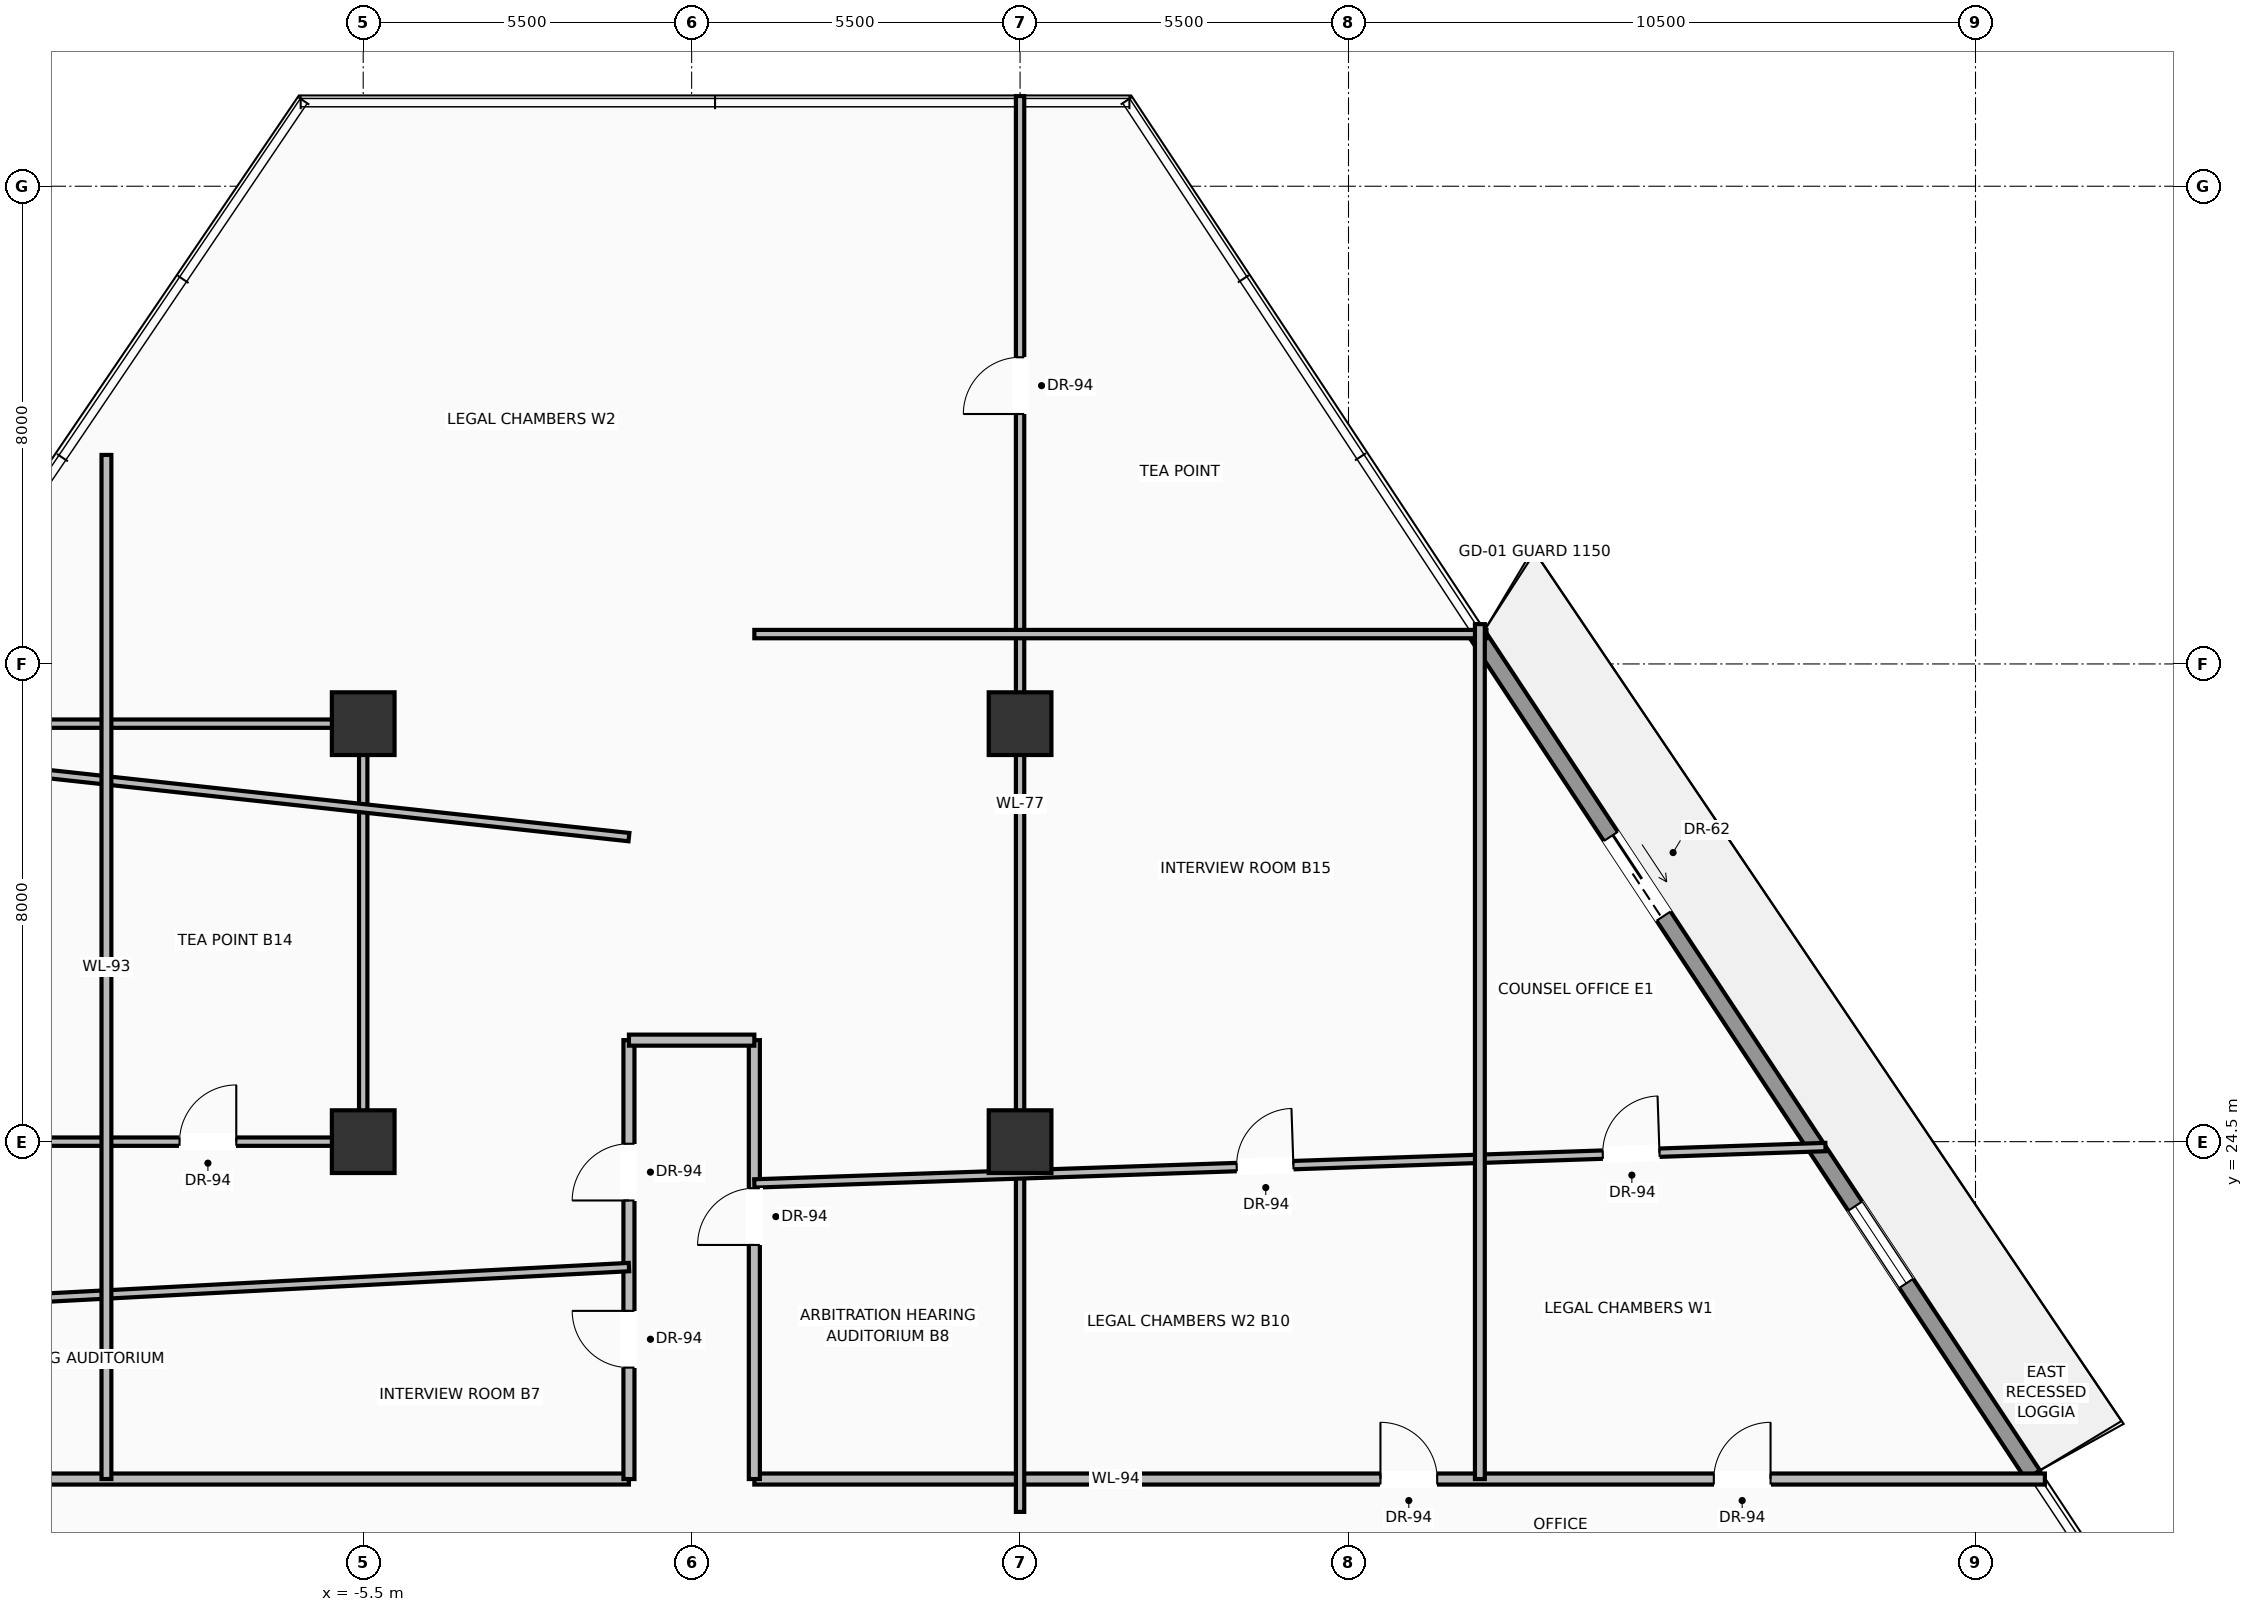
"""IFC4 building model, lengths in metres.
Left out: names, types, materials, properties, quantities, classifications, styles, units other than length and angle.
Written with IfcOpenShell. Run it as: python <this file> out.ifc"""

import sys

from ifc_helpers import new_model, si_unit, direction, frame, frame_2d, origin, origin_2d, place, context, subcontext, project, spatial, rectangle, extrude, source, transform, mapped, element, fill, save


model = new_model("IFC4")
c1 = context("Model", 3, precision=1e-05, world=origin(), true_north=direction((0.0, 1.0)))
c2 = subcontext(c1, "Body", "Model", "MODEL_VIEW")
j1 = project(units=[si_unit("LENGTHUNIT", "METRE"), si_unit("PLANEANGLEUNIT", "RADIAN")], contexts=[c1])
p1 = place(None, origin())
s1 = spatial("IfcSite", under=j1, at=p1, CompositionType="ELEMENT")
p2 = place(p1, origin())
s2 = spatial("IfcBuilding", under=s1, at=p2, CompositionType="ELEMENT")
p3 = place(p2, frame((0.0, 0.0, 64.5)))
s3 = spatial("IfcBuildingStorey", under=s2, at=p3, CompositionType="ELEMENT", Elevation=64.5)
m1 = source(origin(), c2, "Body", "SweptSolid", [
    extrude(rectangle(XDim=1.05, YDim=1.05, at=origin_2d()), origin(), (0.0, 0.0, 1.0), 3.7),
])
for number, where, z_axis, x_axis in (
    (1, (-5.5, 24.5, 0.0), (0.0, 0.0, 1.0), (1.0, 0.0, 0.0)),
    (2, (5.5, 24.5, 0.0), (0.0, 0.0, 1.0), (1.0, 0.0, 0.0)),
    (3, (-5.5, 31.5, 0.0), (0.0, 0.0, 1.0), (1.0, 0.0, 0.0)),
    (4, (5.5, 31.5, 0.0), (0.0, 0.0, 1.0), (1.0, 0.0, 0.0)),
):
    element("IfcColumn", number, at=place(p3, frame(where, z_axis=z_axis, x_axis=x_axis)), inside=s3, PredefinedType="COLUMN", context=c2, shape_type="MappedRepresentation", body=[
        mapped(m1, transform((0.0, 0.0, 0.0), scale=1.0)),
    ])
p4 = place(p3, frame((13.162, 32.989, 0.0), z_axis=(0.0, 0.0, 1.0), x_axis=(0.551365400427, -0.834263864261, 0.0)))
e5 = element("IfcWall", 5, at=p4, inside=s3, PredefinedType="SOLIDWALL", context=c2, shape_type="SweptSolid", body=[
    extrude(rectangle(XDim=16.866, YDim=0.28, at=frame_2d((8.433, 0.0))), origin(), (0.0, 0.0, 1.0), 3.03),
])
p5 = place(p4, frame((4.048, 0.0, 0.0)))
e6 = element("IfcOpeningElement", 6, at=p5, cuts=e5, PredefinedType="OPENING", context=c2, shape_type="SweptSolid", body=[
    extrude(rectangle(XDim=1.6, YDim=2.35, at=frame_2d((0.8, 1.175))), frame((0.0, 0.15, 0.0), z_axis=(0.0, -1.0, 0.0), x_axis=(1.0, 0.0, 0.0)), (0.0, 0.0, 1.0), 0.3),
])
p6 = place(p4, frame((11.469, 0.0, 0.9)))
e7 = element("IfcOpeningElement", 7, at=p6, cuts=e5, PredefinedType="OPENING", context=c2, shape_type="SweptSolid", body=[
    extrude(rectangle(XDim=1.55, YDim=1.85, at=frame_2d((0.775, 0.925))), frame((0.0, 0.15, 0.0), z_axis=(0.0, -1.0, 0.0), x_axis=(1.0, 0.0, 0.0)), (0.0, 0.0, 1.0), 0.3),
])
p7 = place(p3, frame((-22.31, 18.85, 0.0), z_axis=(0.0, 0.0, 1.0), x_axis=(1.0, 0.0, 0.0)))
e8 = element("IfcWall", 8, at=p7, inside=s3, PredefinedType="PARTITIONING", context=c2, shape_type="SweptSolid", body=[
    extrude(rectangle(XDim=21.26, YDim=0.185, at=frame_2d((10.63, 0.0))), origin(), (0.0, 0.0, 1.0), 2.747),
])
p8 = place(p7, frame((9.126, 0.0, 0.0)))
e9 = element("IfcOpeningElement", 9, at=p8, cuts=e8, PredefinedType="OPENING", context=c2, shape_type="SweptSolid", body=[
    extrude(rectangle(XDim=0.95, YDim=2.2, at=frame_2d((0.475, 1.1))), frame((0.0, 0.103, 0.0), z_axis=(0.0, -1.0, 0.0), x_axis=(1.0, 0.0, 0.0)), (0.0, 0.0, 1.0), 0.205),
])
p9 = place(p3, frame((1.05, 18.85, 0.0), z_axis=(0.0, 0.0, 1.0), x_axis=(1.0, 0.0, 0.0)))
e10 = element("IfcWall", 10, at=p9, inside=s3, PredefinedType="PARTITIONING", context=c2, shape_type="SweptSolid", body=[
    extrude(rectangle(XDim=21.612, YDim=0.185, at=frame_2d((10.806, 0.0))), origin(), (0.0, 0.0, 1.0), 2.747),
])
p10 = place(p9, frame((10.485, 0.0, 0.0)))
e11 = element("IfcOpeningElement", 11, at=p10, cuts=e10, PredefinedType="OPENING", context=c2, shape_type="SweptSolid", body=[
    extrude(rectangle(XDim=0.95, YDim=2.2, at=frame_2d((0.475, 1.1))), frame((0.0, 0.103, 0.0), z_axis=(0.0, -1.0, 0.0), x_axis=(1.0, 0.0, 0.0)), (0.0, 0.0, 1.0), 0.205),
])
p11 = place(p9, frame((16.068, 0.0, 0.0)))
e12 = element("IfcOpeningElement", 12, at=p11, cuts=e10, PredefinedType="OPENING", context=c2, shape_type="SweptSolid", body=[
    extrude(rectangle(XDim=0.95, YDim=2.2, at=frame_2d((0.475, 1.1))), frame((0.0, 0.103, 0.0), z_axis=(0.0, -1.0, 0.0), x_axis=(1.0, 0.0, 0.0)), (0.0, 0.0, 1.0), 0.205),
])
p12 = place(p3, frame((-1.05, 18.85, 0.0), z_axis=(0.0, 0.0, 1.0), x_axis=(0.0, 1.0, 0.0)))
e13 = element("IfcWall", 13, at=p12, inside=s3, PredefinedType="PARTITIONING", context=c2, shape_type="SweptSolid", body=[
    extrude(rectangle(XDim=7.35, YDim=0.185, at=frame_2d((3.675, 0.0))), origin(), (0.0, 0.0, 1.0), 2.747),
])
p13 = place(p12, frame((1.866, 0.0, 0.0)))
e14 = element("IfcOpeningElement", 14, at=p13, cuts=e13, PredefinedType="OPENING", context=c2, shape_type="SweptSolid", body=[
    extrude(rectangle(XDim=0.95, YDim=2.2, at=frame_2d((0.475, 1.1))), frame((0.0, 0.103, 0.0), z_axis=(0.0, -1.0, 0.0), x_axis=(1.0, 0.0, 0.0)), (0.0, 0.0, 1.0), 0.205),
])
p14 = place(p12, frame((4.665, 0.0, 0.0)))
e15 = element("IfcOpeningElement", 15, at=p14, cuts=e13, PredefinedType="OPENING", context=c2, shape_type="SweptSolid", body=[
    extrude(rectangle(XDim=0.95, YDim=2.2, at=frame_2d((0.475, 1.1))), frame((0.0, 0.103, 0.0), z_axis=(0.0, -1.0, 0.0), x_axis=(1.0, 0.0, 0.0)), (0.0, 0.0, 1.0), 0.205),
])
p15 = place(p3, frame((1.05, 18.85, 0.0), z_axis=(0.0, 0.0, 1.0), x_axis=(0.0, 1.0, 0.0)))
e16 = element("IfcWall", 16, at=p15, inside=s3, PredefinedType="PARTITIONING", context=c2, shape_type="SweptSolid", body=[
    extrude(rectangle(XDim=7.35, YDim=0.185, at=frame_2d((3.675, 0.0))), origin(), (0.0, 0.0, 1.0), 2.747),
])
p16 = place(p15, frame((3.92, 0.0, 0.0)))
e17 = element("IfcOpeningElement", 17, at=p16, cuts=e16, PredefinedType="OPENING", context=c2, shape_type="SweptSolid", body=[
    extrude(rectangle(XDim=0.95, YDim=2.2, at=frame_2d((0.475, 1.1))), frame((0.0, 0.103, 0.0), z_axis=(0.0, -1.0, 0.0), x_axis=(1.0, 0.0, 0.0)), (0.0, 0.0, 1.0), 0.205),
])
p17 = place(p3, frame((-1.05, 26.2, 0.0), z_axis=(0.0, 0.0, 1.0), x_axis=(1.0, 0.0, 0.0)))
e18 = element("IfcWall", 18, at=p17, inside=s3, PredefinedType="PARTITIONING", context=c2, shape_type="SweptSolid", body=[
    extrude(rectangle(XDim=2.1, YDim=0.185, at=frame_2d((1.05, 0.0))), origin(), (0.0, 0.0, 1.0), 3.442),
])
p18 = place(p3, frame((5.5, 18.3, 0.0), z_axis=(0.0, 0.0, 1.0), x_axis=(0.0, 1.0, 0.0)))
e19 = element("IfcWall", 19, at=p18, inside=s3, PredefinedType="PARTITIONING", context=c2, shape_type="SweptSolid", body=[
    extrude(rectangle(XDim=23.71, YDim=0.14, at=frame_2d((11.855, 0.0))), origin(), (0.0, 0.0, 1.0), 2.747),
])
p19 = place(p18, frame((18.385, 0.0, 0.0)))
e20 = element("IfcOpeningElement", 20, at=p19, cuts=e19, PredefinedType="OPENING", context=c2, shape_type="SweptSolid", body=[
    extrude(rectangle(XDim=0.95, YDim=2.2, at=frame_2d((0.475, 1.1))), frame((0.0, 0.08, 0.0), z_axis=(0.0, -1.0, 0.0), x_axis=(1.0, 0.0, 0.0)), (0.0, 0.0, 1.0), 0.16),
])
p20 = place(p3, frame((-18.471, 24.5, 0.0), z_axis=(0.0, 0.0, 1.0), x_axis=(1.0, 0.0, 0.0)))
e21 = element("IfcWall", 21, at=p20, inside=s3, PredefinedType="PARTITIONING", context=c2, shape_type="SweptSolid", body=[
    extrude(rectangle(XDim=12.971, YDim=0.14, at=frame_2d((6.485, 0.0))), origin(), (0.0, 0.0, 1.0), 2.747),
])
p21 = place(p20, frame((4.11, 0.0, 0.0)))
e22 = element("IfcOpeningElement", 22, at=p21, cuts=e21, PredefinedType="OPENING", context=c2, shape_type="SweptSolid", body=[
    extrude(rectangle(XDim=0.95, YDim=2.2, at=frame_2d((0.475, 1.1))), frame((0.0, 0.08, 0.0), z_axis=(0.0, -1.0, 0.0), x_axis=(1.0, 0.0, 0.0)), (0.0, 0.0, 1.0), 0.16),
])
p22 = place(p20, frame((9.895, 0.0, 0.0)))
e23 = element("IfcOpeningElement", 23, at=p22, cuts=e21, PredefinedType="OPENING", context=c2, shape_type="SweptSolid", body=[
    extrude(rectangle(XDim=0.95, YDim=2.2, at=frame_2d((0.475, 1.1))), frame((0.0, 0.08, 0.0), z_axis=(0.0, -1.0, 0.0), x_axis=(1.0, 0.0, 0.0)), (0.0, 0.0, 1.0), 0.16),
])
p23 = place(p3, frame((-5.5, 24.5, 0.0), z_axis=(0.0, 0.0, 1.0), x_axis=(0.0, 1.0, 0.0)))
e24 = element("IfcWall", 24, at=p23, inside=s3, PredefinedType="PARTITIONING", context=c2, shape_type="SweptSolid", body=[
    extrude(rectangle(XDim=7.0, YDim=0.14, at=frame_2d((3.5, 0.0))), origin(), (0.0, 0.0, 1.0), 2.747),
])
p24 = place(p3, frame((-13.714, 31.5, 0.0), z_axis=(0.0, 0.0, 1.0), x_axis=(1.0, 0.0, 0.0)))
e25 = element("IfcWall", 25, at=p24, inside=s3, PredefinedType="PARTITIONING", context=c2, shape_type="SweptSolid", body=[
    extrude(rectangle(XDim=8.214, YDim=0.14, at=frame_2d((4.107, 0.0))), origin(), (0.0, 0.0, 1.0), 2.747),
])
p25 = place(p3, frame((-20.595, 21.374, 0.0), z_axis=(0.0, 0.0, 1.0), x_axis=(0.998625331151, 0.052416104246, 0.0)))
e26 = element("IfcWall", 26, at=p25, inside=s3, PredefinedType="PARTITIONING", context=c2, shape_type="SweptSolid", body=[
    extrude(rectangle(XDim=19.572, YDim=0.14, at=frame_2d((9.786, 0.0))), origin(), (0.0, 0.0, 1.0), 2.747),
])
p26 = place(p25, frame((5.233, 0.0, 0.0)))
e27 = element("IfcOpeningElement", 27, at=p26, cuts=e26, PredefinedType="OPENING", context=c2, shape_type="SweptSolid", body=[
    extrude(rectangle(XDim=0.95, YDim=2.2, at=frame_2d((0.475, 1.1))), frame((0.0, 0.08, 0.0), z_axis=(0.0, -1.0, 0.0), x_axis=(1.0, 0.0, 0.0)), (0.0, 0.0, 1.0), 0.16),
])
p27 = place(p3, frame((-14.046, 31.011, 0.0), z_axis=(0.0, 0.0, 1.0), x_axis=(0.994160894158, -0.107907907622, 0.0)))
e28 = element("IfcWall", 28, at=p27, inside=s3, PredefinedType="PARTITIONING", context=c2, shape_type="SweptSolid", body=[
    extrude(rectangle(XDim=13.073, YDim=0.14, at=frame_2d((6.536, 0.0))), origin(), (0.0, 0.0, 1.0), 2.747),
])
p28 = place(p3, frame((1.05, 23.8, 0.0), z_axis=(0.0, 0.0, 1.0), x_axis=(0.999422522818, 0.033979712843, 0.0)))
e29 = element("IfcWall", 29, at=p28, inside=s3, PredefinedType="PARTITIONING", context=c2, shape_type="SweptSolid", body=[
    extrude(rectangle(XDim=17.948, YDim=0.14, at=frame_2d((8.974, 0.0))), origin(), (0.0, 0.0, 1.0), 2.747),
])
p29 = place(p28, frame((8.082, 0.0, 0.0)))
e30 = element("IfcOpeningElement", 30, at=p29, cuts=e29, PredefinedType="OPENING", context=c2, shape_type="SweptSolid", body=[
    extrude(rectangle(XDim=0.95, YDim=2.2, at=frame_2d((0.475, 1.1))), frame((0.0, 0.08, 0.0), z_axis=(0.0, -1.0, 0.0), x_axis=(1.0, 0.0, 0.0)), (0.0, 0.0, 1.0), 0.16),
])
p30 = place(p28, frame((14.216, 0.0, 0.0)))
e31 = element("IfcOpeningElement", 31, at=p30, cuts=e29, PredefinedType="OPENING", context=c2, shape_type="SweptSolid", body=[
    extrude(rectangle(XDim=0.95, YDim=2.2, at=frame_2d((0.475, 1.1))), frame((0.0, 0.08, 0.0), z_axis=(0.0, -1.0, 0.0), x_axis=(1.0, 0.0, 0.0)), (0.0, 0.0, 1.0), 0.16),
])
p31 = place(p3, frame((1.05, 33.0, 0.0), z_axis=(0.0, 0.0, 1.0), x_axis=(1.0, 0.0, 0.0)))
e32 = element("IfcWall", 32, at=p31, inside=s3, PredefinedType="PARTITIONING", context=c2, shape_type="SweptSolid", body=[
    extrude(rectangle(XDim=12.26, YDim=0.14, at=frame_2d((6.13, 0.0))), origin(), (0.0, 0.0, 1.0), 2.747),
])
p32 = place(p3, frame((-9.8, 18.85, 0.0), z_axis=(0.0, 0.0, 1.0), x_axis=(0.0, 1.0, 0.0)))
e33 = element("IfcWall", 33, at=p32, inside=s3, PredefinedType="PARTITIONING", context=c2, shape_type="SweptSolid", body=[
    extrude(rectangle(XDim=17.15, YDim=0.165, at=frame_2d((8.575, 0.0))), origin(), (0.0, 0.0, 1.0), 2.747),
])
p33 = place(p3, frame((13.2, 18.85, 0.0), z_axis=(0.0, 0.0, 1.0), x_axis=(0.0, 1.0, 0.0)))
e34 = element("IfcWall", 34, at=p33, inside=s3, PredefinedType="PARTITIONING", context=c2, shape_type="SweptSolid", body=[
    extrude(rectangle(XDim=14.317, YDim=0.165, at=frame_2d((7.158, 0.0))), origin(), (0.0, 0.0, 1.0), 2.747),
])
m2 = source(origin(), c2, "Body", "SweptSolid", [
    extrude(rectangle(XDim=1.6, YDim=2.35, at=frame_2d((0.8, 1.175))), frame((0.0, 0.025, 0.0), z_axis=(0.0, -1.0, 0.0), x_axis=(1.0, 0.0, 0.0)), (0.0, 0.0, 1.0), 0.05),
])
p34 = place(p5, origin())
e35 = element("IfcDoor", 35, at=p34, inside=s3, OperationType="SLIDING_TO_RIGHT", PredefinedType="DOOR", context=c2, shape_type="MappedRepresentation", body=[
    mapped(m2, transform((0.0, 0.0, 0.0), scale=1.0)),
])
fill(e6, e35)
m3 = source(origin(), c2, "Body", "SweptSolid", [
    extrude(rectangle(XDim=1.55, YDim=1.85, at=frame_2d((0.775, 0.925))), frame((0.0, 0.03, 0.0), z_axis=(0.0, -1.0, 0.0), x_axis=(1.0, 0.0, 0.0)), (0.0, 0.0, 1.0), 0.06),
])
p35 = place(p6, origin())
e36 = element("IfcWindow", 36, at=p35, inside=s3, PartitioningType="SINGLE_PANEL", PredefinedType="WINDOW", context=c2, shape_type="MappedRepresentation", body=[
    mapped(m3, transform((0.0, 0.0, 0.0), scale=1.0)),
])
fill(e7, e36)
m4 = source(origin(), c2, "Body", "SweptSolid", [
    extrude(rectangle(XDim=0.95, YDim=2.2, at=frame_2d((0.475, 1.1))), frame((0.0, 0.025, 0.0), z_axis=(0.0, -1.0, 0.0), x_axis=(1.0, 0.0, 0.0)), (0.0, 0.0, 1.0), 0.05),
])
p36 = place(p10, origin())
e37 = element("IfcDoor", 37, at=p36, inside=s3, OperationType="SINGLE_SWING_LEFT", PredefinedType="DOOR", context=c2, shape_type="MappedRepresentation", body=[
    mapped(m4, transform((0.0, 0.0, 0.0), scale=1.0)),
])
fill(e11, e37)
p37 = place(p13, origin())
e38 = element("IfcDoor", 38, at=p37, inside=s3, OperationType="SINGLE_SWING_RIGHT", PredefinedType="DOOR", context=c2, shape_type="MappedRepresentation", body=[
    mapped(m4, transform((0.0, 0.0, 0.0), scale=1.0)),
])
fill(e14, e38)
p38 = place(p16, origin())
e39 = element("IfcDoor", 39, at=p38, inside=s3, OperationType="SINGLE_SWING_LEFT", PredefinedType="DOOR", context=c2, shape_type="MappedRepresentation", body=[
    mapped(m4, transform((0.0, 0.0, 0.0), scale=1.0)),
])
fill(e17, e39)
p39 = place(p11, origin())
e40 = element("IfcDoor", 40, at=p39, inside=s3, OperationType="SINGLE_SWING_RIGHT", PredefinedType="DOOR", context=c2, shape_type="MappedRepresentation", body=[
    mapped(m4, transform((0.0, 0.0, 0.0), scale=1.0)),
])
fill(e12, e40)
p40 = place(p29, origin())
e41 = element("IfcDoor", 41, at=p40, inside=s3, OperationType="SINGLE_SWING_RIGHT", PredefinedType="DOOR", context=c2, shape_type="MappedRepresentation", body=[
    mapped(m4, transform((0.0, 0.0, 0.0), scale=1.0)),
])
fill(e30, e41)
p41 = place(p14, origin())
e42 = element("IfcDoor", 42, at=p41, inside=s3, OperationType="SINGLE_SWING_LEFT", PredefinedType="DOOR", context=c2, shape_type="MappedRepresentation", body=[
    mapped(m4, transform((0.0, 0.0, 0.0), scale=1.0)),
])
fill(e15, e42)
p42 = place(p30, origin())
e43 = element("IfcDoor", 43, at=p42, inside=s3, OperationType="SINGLE_SWING_RIGHT", PredefinedType="DOOR", context=c2, shape_type="MappedRepresentation", body=[
    mapped(m4, transform((0.0, 0.0, 0.0), scale=1.0)),
])
fill(e31, e43)
p43 = place(p22, origin())
e44 = element("IfcDoor", 44, at=p43, inside=s3, OperationType="SINGLE_SWING_RIGHT", PredefinedType="DOOR", context=c2, shape_type="MappedRepresentation", body=[
    mapped(m4, transform((0.0, 0.0, 0.0), scale=1.0)),
])
fill(e23, e44)
p44 = place(p19, origin())
e45 = element("IfcDoor", 45, at=p44, inside=s3, OperationType="SINGLE_SWING_LEFT", PredefinedType="DOOR", context=c2, shape_type="MappedRepresentation", body=[
    mapped(m4, transform((0.0, 0.0, 0.0), scale=1.0)),
])
fill(e20, e45)
save(model, sys.argv[1])
